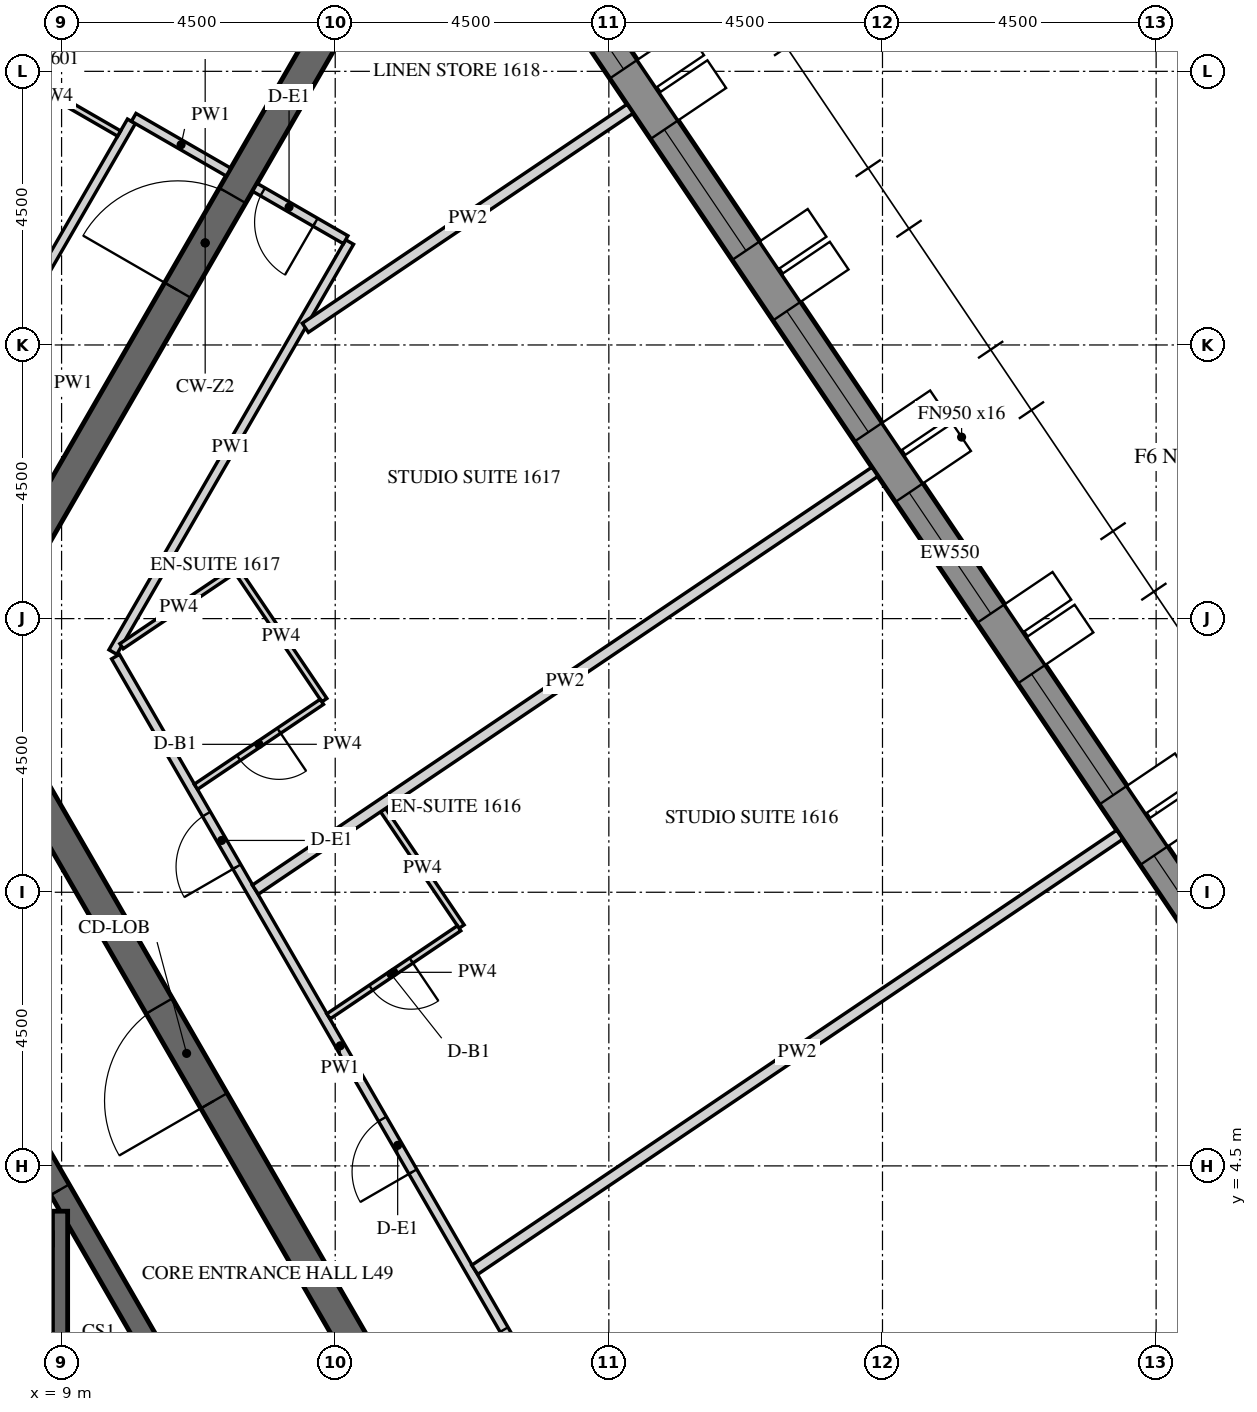
"""IFC4 building model, lengths in metres.
Left out: names, types, materials, properties, quantities, classifications, styles, units other than length and angle.
Written with IfcOpenShell. Run it as: python <this file> out.ifc"""

import sys

from ifc_helpers import new_model, si_unit, direction, frame, frame_2d, origin, place, context, subcontext, project, spatial, polyline, rectangle, outline, extrude, element, fill, save


model = new_model("IFC4")
c1 = context("Model", 3, precision=1e-05, world=origin(), true_north=direction((0.0, 1.0)))
c2 = subcontext(c1, "Body", "Model", "MODEL_VIEW")
j1 = project(units=[si_unit("LENGTHUNIT", "METRE"), si_unit("PLANEANGLEUNIT", "RADIAN")], contexts=[c1])
p1 = place(None, origin())
s1 = spatial("IfcSite", under=j1, at=p1, CompositionType="ELEMENT")
p2 = place(p1, origin())
s2 = spatial("IfcBuilding", under=s1, at=p2, CompositionType="ELEMENT")
p3 = place(p2, frame((0.0, 0.0, 207.3)))
s3 = spatial("IfcBuildingStorey", under=s2, at=p3, CompositionType="ELEMENT", Elevation=207.3)
p4 = place(p3, frame((31.371, 3.071, -0.15), z_axis=(0.0, 0.0, 1.0), x_axis=(-0.559189891278, 0.829039604297, 0.0)))
e1 = element("IfcWall", 1, at=p4, inside=s3, PredefinedType="SOLIDWALL", context=c2, shape_type="SweptSolid", body=[
    extrude(outline(polyline([(-0.026, -0.275), (27.781, -0.275), (27.736, 0.275), (0.026, 0.275), (-0.026, -0.275)])), origin(), (0.0, 0.0, 1.0), 3.9),
])
p5 = place(p4, frame((1.879, 0.0, 1.05)))
e2 = element("IfcOpeningElement", 2, at=p5, cuts=e1, PredefinedType="OPENING", context=c2, shape_type="SweptSolid", body=[
    extrude(rectangle(XDim=2.4, YDim=2.4, at=frame_2d((1.2, 1.2))), frame((0.0, 0.285, 0.0), z_axis=(0.0, -1.0, 0.0), x_axis=(1.0, 0.0, 0.0)), (0.0, 0.0, 1.0), 0.57),
])
p6 = place(p4, frame((5.479, 0.0, 1.05)))
e3 = element("IfcOpeningElement", 3, at=p6, cuts=e1, PredefinedType="OPENING", context=c2, shape_type="SweptSolid", body=[
    extrude(rectangle(XDim=2.4, YDim=2.4, at=frame_2d((1.2, 1.2))), frame((0.0, 0.285, 0.0), z_axis=(0.0, -1.0, 0.0), x_axis=(1.0, 0.0, 0.0)), (0.0, 0.0, 1.0), 0.57),
])
p7 = place(p4, frame((9.079, 0.0, 1.05)))
e4 = element("IfcOpeningElement", 4, at=p7, cuts=e1, PredefinedType="OPENING", context=c2, shape_type="SweptSolid", body=[
    extrude(rectangle(XDim=2.4, YDim=2.4, at=frame_2d((1.2, 1.2))), frame((0.0, 0.285, 0.0), z_axis=(0.0, -1.0, 0.0), x_axis=(1.0, 0.0, 0.0)), (0.0, 0.0, 1.0), 0.57),
])
p8 = place(p4, frame((12.679, 0.0, 1.05)))
e5 = element("IfcOpeningElement", 5, at=p8, cuts=e1, PredefinedType="OPENING", context=c2, shape_type="SweptSolid", body=[
    extrude(rectangle(XDim=2.4, YDim=2.4, at=frame_2d((1.2, 1.2))), frame((0.0, 0.285, 0.0), z_axis=(0.0, -1.0, 0.0), x_axis=(1.0, 0.0, 0.0)), (0.0, 0.0, 1.0), 0.57),
])
p9 = place(p4, frame((16.279, 0.0, 1.05)))
e6 = element("IfcOpeningElement", 6, at=p9, cuts=e1, PredefinedType="OPENING", context=c2, shape_type="SweptSolid", body=[
    extrude(rectangle(XDim=2.4, YDim=2.4, at=frame_2d((1.2, 1.2))), frame((0.0, 0.285, 0.0), z_axis=(0.0, -1.0, 0.0), x_axis=(1.0, 0.0, 0.0)), (0.0, 0.0, 1.0), 0.57),
])
p10 = place(p4, frame((19.879, 0.0, 1.05)))
e7 = element("IfcOpeningElement", 7, at=p10, cuts=e1, PredefinedType="OPENING", context=c2, shape_type="SweptSolid", body=[
    extrude(rectangle(XDim=2.4, YDim=2.4, at=frame_2d((1.2, 1.2))), frame((0.0, 0.285, 0.0), z_axis=(0.0, -1.0, 0.0), x_axis=(1.0, 0.0, 0.0)), (0.0, 0.0, 1.0), 0.57),
])
p11 = place(p4, frame((23.479, 0.0, 1.05)))
e8 = element("IfcOpeningElement", 8, at=p11, cuts=e1, PredefinedType="OPENING", context=c2, shape_type="SweptSolid", body=[
    extrude(rectangle(XDim=2.4, YDim=2.4, at=frame_2d((1.2, 1.2))), frame((0.0, 0.285, 0.0), z_axis=(0.0, -1.0, 0.0), x_axis=(1.0, 0.0, 0.0)), (0.0, 0.0, 1.0), 0.57),
])
p12 = place(p3, frame((14.722, 0.0, -0.15), z_axis=(0.0, 0.0, 1.0), x_axis=(-0.50000571537, 0.866022103989, 0.0)))
e9 = element("IfcWall", 9, at=p12, inside=s3, PredefinedType="SHEAR", context=c2, shape_type="SweptSolid", body=[
    extrude(outline(polyline([(-0.144, -0.25), (14.867, -0.25), (14.578, 0.25), (0.144, 0.25), (-0.144, -0.25)])), origin(), (0.0, 0.0, 1.0), 3.9),
])
p13 = place(p12, frame((6.432, 0.0, 0.15)))
e10 = element("IfcOpeningElement", 10, at=p13, cuts=e9, PredefinedType="OPENING", context=c2, shape_type="SweptSolid", body=[
    extrude(rectangle(XDim=1.8, YDim=2.4, at=frame_2d((0.9, 1.2))), frame((0.0, 0.26, 0.0), z_axis=(0.0, -1.0, 0.0), x_axis=(1.0, 0.0, 0.0)), (0.0, 0.0, 1.0), 0.52),
])
p14 = place(p3, frame((7.506, 13.0, -0.15), z_axis=(0.0, 0.0, 1.0), x_axis=(0.499988271576, 0.866032175087, 0.0)))
e11 = element("IfcWall", 11, at=p14, inside=s3, PredefinedType="SHEAR", context=c2, shape_type="SweptSolid", body=[
    extrude(rectangle(XDim=15.424, YDim=0.5, at=frame_2d((7.712, 0.0))), origin(), (0.0, 0.0, 1.0), 3.9),
])
p15 = place(p14, frame((6.812, 0.0, 0.15)))
e12 = element("IfcOpeningElement", 12, at=p15, cuts=e11, PredefinedType="OPENING", context=c2, shape_type="SweptSolid", body=[
    extrude(rectangle(XDim=1.8, YDim=2.4, at=frame_2d((0.9, 1.2))), frame((0.0, 0.26, 0.0), z_axis=(0.0, -1.0, 0.0), x_axis=(1.0, 0.0, 0.0)), (0.0, 0.0, 1.0), 0.52),
])
p16 = place(p3, frame((11.345, 0.0, -0.15), z_axis=(0.0, 0.0, 1.0), x_axis=(-0.499995046907, 0.866028263435, 0.0)))
e13 = element("IfcWall", 13, at=p16, inside=s3, PredefinedType="SHEAR", context=c2, shape_type="SweptSolid", body=[
    extrude(outline(polyline([(-0.101, -0.175), (11.446, -0.175), (11.244, 0.175), (0.101, 0.175), (-0.101, -0.175)])), origin(), (0.0, 0.0, 1.0), 3.9),
])
p17 = place(p16, frame((4.744, 0.0, 0.15)))
e14 = element("IfcOpeningElement", 14, at=p17, cuts=e13, PredefinedType="OPENING", context=c2, shape_type="SweptSolid", body=[
    extrude(rectangle(XDim=1.8, YDim=2.4, at=frame_2d((0.9, 1.2))), frame((0.0, 0.185, 0.0), z_axis=(0.0, -1.0, 0.0), x_axis=(1.0, 0.0, 0.0)), (0.0, 0.0, 1.0), 0.37),
])
p18 = place(p3, frame((8.975, -3.755, -0.25), z_axis=(0.0, 0.0, 1.0), x_axis=(0.0, 1.0, 0.0)))
e15 = element("IfcWall", 15, at=p18, inside=s3, PredefinedType="SHEAR", context=c2, shape_type="SweptSolid", body=[
    extrude(rectangle(XDim=7.51, YDim=0.25, at=frame_2d((3.755, 0.0))), origin(), (0.0, 0.0, 1.0), 3.9),
])
p19 = place(p3, frame((5.9, 3.3, -0.25), z_axis=(0.0, 0.0, 1.0), x_axis=(1.0, 0.0, 0.0)))
e16 = element("IfcWall", 16, at=p19, inside=s3, PredefinedType="SHEAR", context=c2, shape_type="SweptSolid", body=[
    extrude(rectangle(XDim=2.95, YDim=0.2, at=frame_2d((1.475, 0.0))), origin(), (0.0, 0.0, 1.0), 3.9),
])
p20 = place(p3, frame((10.149, 21.678, 0.0), z_axis=(0.0, 0.0, 1.0), x_axis=(-0.499993780622, -0.866028994514, 0.0)))
e17 = element("IfcWall", 17, at=p20, inside=s3, PredefinedType="PARTITIONING", context=c2, shape_type="SweptSolid", body=[
    extrude(rectangle(XDim=7.711, YDim=0.15, at=frame_2d((3.855, 0.0))), origin(), (0.0, 0.0, 1.0), 2.988),
])
p21 = place(p20, frame((4.718, 0.0, 0.0)))
e18 = element("IfcOpeningElement", 18, at=p21, cuts=e17, PredefinedType="OPENING", context=c2, shape_type="SweptSolid", body=[
    extrude(rectangle(XDim=1.0, YDim=2.1, at=frame_2d((0.5, 1.05))), frame((0.0, 0.085, 0.0), z_axis=(0.0, -1.0, 0.0), x_axis=(1.0, 0.0, 0.0)), (0.0, 0.0, 1.0), 0.17),
])
p22 = place(p3, frame((11.745, 20.843, 0.0), z_axis=(0.0, 0.0, 1.0), x_axis=(-0.865989075817, 0.500062916607, 0.0)))
e19 = element("IfcWall", 19, at=p22, inside=s3, PredefinedType="PARTITIONING", context=c2, shape_type="SweptSolid", body=[
    extrude(rectangle(XDim=1.8, YDim=0.15, at=frame_2d((0.9, 0.0))), origin(), (0.0, 0.0, 1.0), 2.988),
])
p23 = place(p3, frame((17.277, 0.075, 0.0), z_axis=(0.0, 0.0, 1.0), x_axis=(-0.499988884089, 0.866031821464, 0.0)))
e20 = element("IfcWall", 20, at=p23, inside=s3, PredefinedType="PARTITIONING", context=c2, shape_type="SweptSolid", body=[
    extrude(rectangle(XDim=14.78, YDim=0.15, at=frame_2d((7.39, 0.0))), origin(), (0.0, 0.0, 1.0), 2.988),
])
p24 = place(p23, frame((1.001, 0.0, 0.0)))
e21 = element("IfcOpeningElement", 21, at=p24, cuts=e20, PredefinedType="OPENING", context=c2, shape_type="SweptSolid", body=[
    extrude(rectangle(XDim=1.0, YDim=2.1, at=frame_2d((0.5, 1.05))), frame((0.0, 0.085, 0.0), z_axis=(0.0, -1.0, 0.0), x_axis=(1.0, 0.0, 0.0)), (0.0, 0.0, 1.0), 0.17),
])
p25 = place(p23, frame((5.0, 0.0, 0.0)))
e22 = element("IfcOpeningElement", 22, at=p25, cuts=e20, PredefinedType="OPENING", context=c2, shape_type="SweptSolid", body=[
    extrude(rectangle(XDim=1.0, YDim=2.1, at=frame_2d((0.5, 1.05))), frame((0.0, 0.085, 0.0), z_axis=(0.0, -1.0, 0.0), x_axis=(1.0, 0.0, 0.0)), (0.0, 0.0, 1.0), 0.17),
])
p26 = place(p23, frame((10.79, 0.0, 0.0)))
e23 = element("IfcOpeningElement", 23, at=p26, cuts=e20, PredefinedType="OPENING", context=c2, shape_type="SweptSolid", body=[
    extrude(rectangle(XDim=1.0, YDim=2.1, at=frame_2d((0.5, 1.05))), frame((0.0, 0.085, 0.0), z_axis=(0.0, -1.0, 0.0), x_axis=(1.0, 0.0, 0.0)), (0.0, 0.0, 1.0), 0.17),
])
p27 = place(p3, frame((9.844, 12.95, 0.0), z_axis=(0.0, 0.0, 1.0), x_axis=(0.500003831281, 0.866023191782, 0.0)))
e24 = element("IfcWall", 24, at=p27, inside=s3, PredefinedType="PARTITIONING", context=c2, shape_type="SweptSolid", body=[
    extrude(rectangle(XDim=7.786, YDim=0.15, at=frame_2d((3.893, 0.0))), origin(), (0.0, 0.0, 1.0), 2.988),
])
p28 = place(p3, frame((13.672, 19.73, 0.0), z_axis=(0.0, 0.0, 1.0), x_axis=(-0.866074815912, 0.499914405916, 0.0)))
e25 = element("IfcWall", 25, at=p28, inside=s3, PredefinedType="PARTITIONING", context=c2, shape_type="SweptSolid", body=[
    extrude(rectangle(XDim=1.725, YDim=0.15, at=frame_2d((0.862, 0.0))), origin(), (0.0, 0.0, 1.0), 2.988),
])
p29 = place(p28, frame((0.575, 0.0, 0.0)))
e26 = element("IfcOpeningElement", 26, at=p29, cuts=e25, PredefinedType="OPENING", context=c2, shape_type="SweptSolid", body=[
    extrude(rectangle(XDim=1.0, YDim=2.1, at=frame_2d((0.5, 1.05))), frame((0.0, 0.085, 0.0), z_axis=(0.0, -1.0, 0.0), x_axis=(1.0, 0.0, 0.0)), (0.0, 0.0, 1.0), 0.17),
])
p30 = place(p3, frame((7.803, 22.715, 0.0), z_axis=(0.0, 0.0, 1.0), x_axis=(0.866006523861, -0.500032699561, 0.0)))
e27 = element("IfcWall", 27, at=p30, inside=s3, PredefinedType="PARTITIONING", context=c2, shape_type="SweptSolid", body=[
    extrude(rectangle(XDim=2.475, YDim=0.1, at=frame_2d((1.237, 0.0))), origin(), (0.0, 0.0, 1.0), 2.988),
])
p31 = place(p3, frame((26.402, 9.946, 0.0), z_axis=(0.0, 0.0, 1.0), x_axis=(-0.829037771727, -0.559192608187, 0.0)))
e28 = element("IfcWall", 28, at=p31, inside=s3, PredefinedType="PARTITIONING", context=c2, shape_type="SweptSolid", body=[
    extrude(rectangle(XDim=12.794, YDim=0.18, at=frame_2d((6.397, 0.0))), origin(), (0.0, 0.0, 1.0), 2.988),
])
p32 = place(p3, frame((14.287, 10.351, 0.0), z_axis=(0.0, 0.0, 1.0), x_axis=(0.559204176839, -0.829029968461, 0.0)))
e29 = element("IfcWall", 29, at=p32, inside=s3, PredefinedType="PARTITIONING", context=c2, shape_type="SweptSolid", body=[
    extrude(rectangle(XDim=2.31, YDim=0.1, at=frame_2d((1.155, 0.0))), origin(), (0.0, 0.0, 1.0), 2.988),
])
p33 = place(p3, frame((15.537, 8.408, 0.0), z_axis=(0.0, 0.0, 1.0), x_axis=(-0.829051810631, -0.559171794076, 0.0)))
e30 = element("IfcWall", 30, at=p33, inside=s3, PredefinedType="PARTITIONING", context=c2, shape_type="SweptSolid", body=[
    extrude(rectangle(XDim=2.591, YDim=0.1, at=frame_2d((1.295, 0.0))), origin(), (0.0, 0.0, 1.0), 2.988),
])
p34 = place(p33, frame((0.95, 0.0, 0.0)))
e31 = element("IfcOpeningElement", 31, at=p34, cuts=e30, PredefinedType="OPENING", context=c2, shape_type="SweptSolid", body=[
    extrude(rectangle(XDim=0.8, YDim=2.1, at=frame_2d((0.4, 1.05))), frame((0.0, 0.06, 0.0), z_axis=(0.0, -1.0, 0.0), x_axis=(1.0, 0.0, 0.0)), (0.0, 0.0, 1.0), 0.12),
])
p35 = place(p3, frame((22.376, 15.915, 0.0), z_axis=(0.0, 0.0, 1.0), x_axis=(-0.829034008237, -0.559198187753, 0.0)))
e32 = element("IfcWall", 32, at=p35, inside=s3, PredefinedType="PARTITIONING", context=c2, shape_type="SweptSolid", body=[
    extrude(rectangle(XDim=12.291, YDim=0.18, at=frame_2d((6.145, 0.0))), origin(), (0.0, 0.0, 1.0), 2.988),
])
p36 = place(p3, frame((9.986, 13.046, 0.0), z_axis=(0.0, 0.0, 1.0), x_axis=(0.829043139518, 0.55918465002, 0.0)))
e33 = element("IfcWall", 33, at=p36, inside=s3, PredefinedType="PARTITIONING", context=c2, shape_type="SweptSolid", body=[
    extrude(rectangle(XDim=2.27, YDim=0.1, at=frame_2d((1.135, 0.0))), origin(), (0.0, 0.0, 1.0), 2.988),
])
p37 = place(p3, frame((11.896, 14.273, 0.0), z_axis=(0.0, 0.0, 1.0), x_axis=(0.559155442782, -0.829062838878, 0.0)))
e34 = element("IfcWall", 34, at=p37, inside=s3, PredefinedType="PARTITIONING", context=c2, shape_type="SweptSolid", body=[
    extrude(rectangle(XDim=2.55, YDim=0.1, at=frame_2d((1.275, 0.0))), origin(), (0.0, 0.0, 1.0), 2.988),
])
p38 = place(p3, frame((13.28, 12.132, 0.0), z_axis=(0.0, 0.0, 1.0), x_axis=(-0.829015218944, -0.559226042634, 0.0)))
e35 = element("IfcWall", 35, at=p38, inside=s3, PredefinedType="PARTITIONING", context=c2, shape_type="SweptSolid", body=[
    extrude(rectangle(XDim=2.498, YDim=0.1, at=frame_2d((1.249, 0.0))), origin(), (0.0, 0.0, 1.0), 2.988),
])
p39 = place(p38, frame((0.85, 0.0, 0.0)))
e36 = element("IfcOpeningElement", 36, at=p39, cuts=e35, PredefinedType="OPENING", context=c2, shape_type="SweptSolid", body=[
    extrude(rectangle(XDim=0.8, YDim=2.1, at=frame_2d((0.4, 1.05))), frame((0.0, 0.06, 0.0), z_axis=(0.0, -1.0, 0.0), x_axis=(1.0, 0.0, 0.0)), (0.0, 0.0, 1.0), 0.12),
])
p40 = place(p3, frame((18.35, 21.884, 0.0), z_axis=(0.0, 0.0, 1.0), x_axis=(-0.829047205772, -0.559178621374, 0.0)))
e37 = element("IfcWall", 37, at=p40, inside=s3, PredefinedType="PARTITIONING", context=c2, shape_type="SweptSolid", body=[
    extrude(rectangle(XDim=6.442, YDim=0.18, at=frame_2d((3.221, 0.0))), origin(), (0.0, 0.0, 1.0), 2.988),
])
p41 = place(p6, frame((0.0, 0.205, 0.0)))
e38 = element("IfcWindow", 38, at=p41, inside=s3, PartitioningType="DOUBLE_PANEL_VERTICAL", PredefinedType="WINDOW", context=c2, shape_type="SweptSolid", body=[
    extrude(rectangle(XDim=2.4, YDim=2.4, at=frame_2d((1.2, 1.2))), frame((0.0, 0.03, 0.0), z_axis=(0.0, -1.0, 0.0), x_axis=(1.0, 0.0, 0.0)), (0.0, 0.0, 1.0), 0.06),
])
fill(e3, e38)
p42 = place(p7, frame((0.0, 0.205, 0.0)))
e39 = element("IfcWindow", 39, at=p42, inside=s3, PartitioningType="DOUBLE_PANEL_VERTICAL", PredefinedType="WINDOW", context=c2, shape_type="SweptSolid", body=[
    extrude(rectangle(XDim=2.4, YDim=2.4, at=frame_2d((1.2, 1.2))), frame((0.0, 0.03, 0.0), z_axis=(0.0, -1.0, 0.0), x_axis=(1.0, 0.0, 0.0)), (0.0, 0.0, 1.0), 0.06),
])
fill(e4, e39)
p43 = place(p8, frame((0.0, 0.205, 0.0)))
e40 = element("IfcWindow", 40, at=p43, inside=s3, PartitioningType="DOUBLE_PANEL_VERTICAL", PredefinedType="WINDOW", context=c2, shape_type="SweptSolid", body=[
    extrude(rectangle(XDim=2.4, YDim=2.4, at=frame_2d((1.2, 1.2))), frame((0.0, 0.03, 0.0), z_axis=(0.0, -1.0, 0.0), x_axis=(1.0, 0.0, 0.0)), (0.0, 0.0, 1.0), 0.06),
])
fill(e5, e40)
p44 = place(p9, frame((0.0, 0.205, 0.0)))
e41 = element("IfcWindow", 41, at=p44, inside=s3, PartitioningType="DOUBLE_PANEL_VERTICAL", PredefinedType="WINDOW", context=c2, shape_type="SweptSolid", body=[
    extrude(rectangle(XDim=2.4, YDim=2.4, at=frame_2d((1.2, 1.2))), frame((0.0, 0.03, 0.0), z_axis=(0.0, -1.0, 0.0), x_axis=(1.0, 0.0, 0.0)), (0.0, 0.0, 1.0), 0.06),
])
fill(e6, e41)
p45 = place(p10, frame((0.0, 0.205, 0.0)))
e42 = element("IfcWindow", 42, at=p45, inside=s3, PartitioningType="DOUBLE_PANEL_VERTICAL", PredefinedType="WINDOW", context=c2, shape_type="SweptSolid", body=[
    extrude(rectangle(XDim=2.4, YDim=2.4, at=frame_2d((1.2, 1.2))), frame((0.0, 0.03, 0.0), z_axis=(0.0, -1.0, 0.0), x_axis=(1.0, 0.0, 0.0)), (0.0, 0.0, 1.0), 0.06),
])
fill(e7, e42)
p46 = place(p11, frame((0.0, 0.205, 0.0)))
e43 = element("IfcWindow", 43, at=p46, inside=s3, PartitioningType="DOUBLE_PANEL_VERTICAL", PredefinedType="WINDOW", context=c2, shape_type="SweptSolid", body=[
    extrude(rectangle(XDim=2.4, YDim=2.4, at=frame_2d((1.2, 1.2))), frame((0.0, 0.03, 0.0), z_axis=(0.0, -1.0, 0.0), x_axis=(1.0, 0.0, 0.0)), (0.0, 0.0, 1.0), 0.06),
])
fill(e8, e43)
p47 = place(p13, origin())
e44 = element("IfcDoor", 44, at=p47, inside=s3, OperationType="DOUBLE_DOOR_SINGLE_SWING", PredefinedType="DOOR", context=c2, shape_type="SweptSolid", body=[
    extrude(rectangle(XDim=1.8, YDim=2.4, at=frame_2d((0.9, 1.2))), frame((0.0, 0.025, 0.0), z_axis=(0.0, -1.0, 0.0), x_axis=(1.0, 0.0, 0.0)), (0.0, 0.0, 1.0), 0.05),
])
fill(e10, e44)
p48 = place(p15, origin())
e45 = element("IfcDoor", 45, at=p48, inside=s3, OperationType="DOUBLE_DOOR_SINGLE_SWING", PredefinedType="DOOR", context=c2, shape_type="SweptSolid", body=[
    extrude(rectangle(XDim=1.8, YDim=2.4, at=frame_2d((0.9, 1.2))), frame((0.0, 0.025, 0.0), z_axis=(0.0, -1.0, 0.0), x_axis=(1.0, 0.0, 0.0)), (0.0, 0.0, 1.0), 0.05),
])
fill(e12, e45)
p49 = place(p17, origin())
e46 = element("IfcDoor", 46, at=p49, inside=s3, OperationType="DOUBLE_DOOR_SINGLE_SWING", PredefinedType="DOOR", context=c2, shape_type="SweptSolid", body=[
    extrude(rectangle(XDim=1.8, YDim=2.4, at=frame_2d((0.9, 1.2))), frame((0.0, 0.025, 0.0), z_axis=(0.0, -1.0, 0.0), x_axis=(1.0, 0.0, 0.0)), (0.0, 0.0, 1.0), 0.05),
])
fill(e14, e46)
p50 = place(p24, origin())
e47 = element("IfcDoor", 47, at=p50, inside=s3, OperationType="SINGLE_SWING_RIGHT", PredefinedType="DOOR", context=c2, shape_type="SweptSolid", body=[
    extrude(rectangle(XDim=1.0, YDim=2.1, at=frame_2d((0.5, 1.05))), frame((0.0, 0.025, 0.0), z_axis=(0.0, -1.0, 0.0), x_axis=(1.0, 0.0, 0.0)), (0.0, 0.0, 1.0), 0.05),
])
fill(e21, e47)
p51 = place(p25, origin())
e48 = element("IfcDoor", 48, at=p51, inside=s3, OperationType="SINGLE_SWING_LEFT", PredefinedType="DOOR", context=c2, shape_type="SweptSolid", body=[
    extrude(rectangle(XDim=1.0, YDim=2.1, at=frame_2d((0.5, 1.05))), frame((0.0, 0.025, 0.0), z_axis=(0.0, -1.0, 0.0), x_axis=(1.0, 0.0, 0.0)), (0.0, 0.0, 1.0), 0.05),
])
fill(e22, e48)
p52 = place(p34, origin())
e49 = element("IfcDoor", 49, at=p52, inside=s3, OperationType="SINGLE_SWING_LEFT", PredefinedType="DOOR", context=c2, shape_type="SweptSolid", body=[
    extrude(rectangle(XDim=0.8, YDim=2.1, at=frame_2d((0.4, 1.05))), frame((0.0, 0.025, 0.0), z_axis=(0.0, -1.0, 0.0), x_axis=(1.0, 0.0, 0.0)), (0.0, 0.0, 1.0), 0.05),
])
fill(e31, e49)
p53 = place(p26, origin())
e50 = element("IfcDoor", 50, at=p53, inside=s3, OperationType="SINGLE_SWING_RIGHT", PredefinedType="DOOR", context=c2, shape_type="SweptSolid", body=[
    extrude(rectangle(XDim=1.0, YDim=2.1, at=frame_2d((0.5, 1.05))), frame((0.0, 0.025, 0.0), z_axis=(0.0, -1.0, 0.0), x_axis=(1.0, 0.0, 0.0)), (0.0, 0.0, 1.0), 0.05),
])
fill(e23, e50)
p54 = place(p39, origin())
e51 = element("IfcDoor", 51, at=p54, inside=s3, OperationType="SINGLE_SWING_LEFT", PredefinedType="DOOR", context=c2, shape_type="SweptSolid", body=[
    extrude(rectangle(XDim=0.8, YDim=2.1, at=frame_2d((0.4, 1.05))), frame((0.0, 0.025, 0.0), z_axis=(0.0, -1.0, 0.0), x_axis=(1.0, 0.0, 0.0)), (0.0, 0.0, 1.0), 0.05),
])
fill(e36, e51)
p55 = place(p29, origin())
e52 = element("IfcDoor", 52, at=p55, inside=s3, OperationType="SINGLE_SWING_LEFT", PredefinedType="DOOR", context=c2, shape_type="SweptSolid", body=[
    extrude(rectangle(XDim=1.0, YDim=2.1, at=frame_2d((0.5, 1.05))), frame((0.0, 0.025, 0.0), z_axis=(0.0, -1.0, 0.0), x_axis=(1.0, 0.0, 0.0)), (0.0, 0.0, 1.0), 0.05),
])
fill(e26, e52)
save(model, sys.argv[1])
